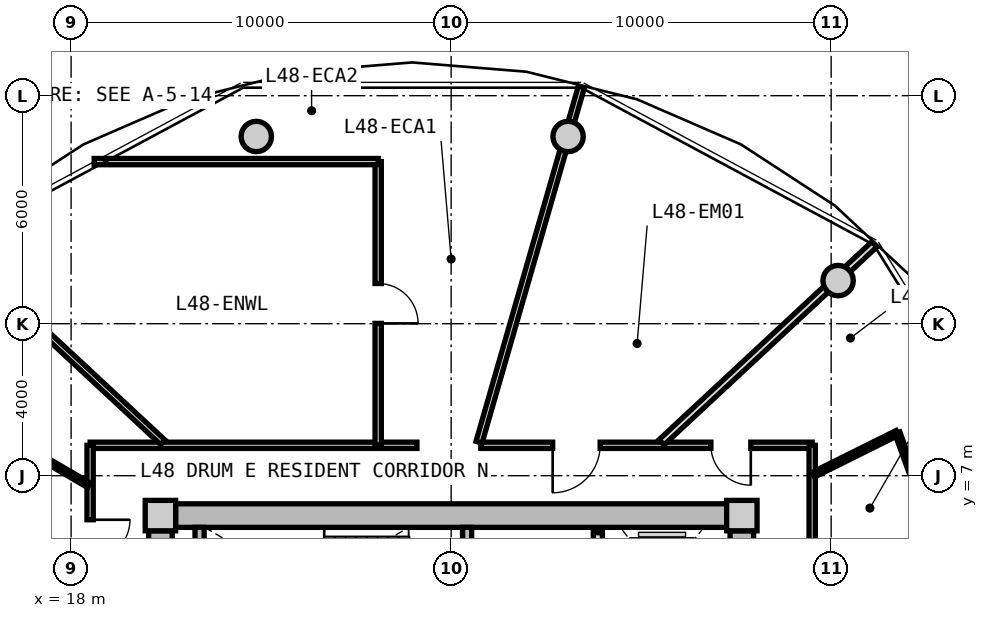
"""IFC4 building model, lengths in metres.
Left out: names, types, materials, properties, quantities, classifications, styles, units other than length and angle.
Written with IfcOpenShell. Run it as: python <this file> out.ifc"""

import sys

from ifc_helpers import new_model, si_unit, direction, frame, frame_2d, origin, origin_2d, place, context, subcontext, project, spatial, rectangle, circle, extrude, source, transform, mapped, element, fill, save


model = new_model("IFC4")
c1 = context("Model", 3, precision=1e-05, world=origin(), true_north=direction((0.0, 1.0)))
c2 = subcontext(c1, "Body", "Model", "MODEL_VIEW")
j1 = project(units=[si_unit("LENGTHUNIT", "METRE"), si_unit("PLANEANGLEUNIT", "RADIAN")], contexts=[c1])
p1 = place(None, origin())
s1 = spatial("IfcSite", under=j1, at=p1, CompositionType="ELEMENT")
p2 = place(p1, origin())
s2 = spatial("IfcBuilding", under=s1, at=p2, CompositionType="ELEMENT")
p3 = place(p2, frame((0.0, 0.0, 155.65)))
s3 = spatial("IfcBuildingStorey", under=s2, at=p3, CompositionType="ELEMENT", Elevation=155.65)
m1 = source(origin(), c2, "Body", "SweptSolid", [
    extrude(rectangle(XDim=0.8, YDim=0.8, at=origin_2d()), origin(), (0.0, 0.0, 1.0), 3.05),
])
for number, where, z_axis, x_axis in (
    (1, (35.65, 5.95, 0.0), (0.0, 0.0, 1.0), (1.0, 0.0, 0.0)),
    (2, (20.35, 5.95, 0.0), (0.0, 0.0, 1.0), (1.0, 0.0, 0.0)),
):
    element("IfcColumn", number, at=place(p3, frame(where, z_axis=z_axis, x_axis=x_axis)), inside=s3, PredefinedType="COLUMN", context=c2, shape_type="MappedRepresentation", body=[
        mapped(m1, transform((0.0, 0.0, 0.0), x_axis=(1.0, 0.0, 0.0), y_axis=(0.0, 1.0, 0.0), z_axis=(0.0, 0.0, 1.0), scale=1.0)),
    ])
m2 = source(origin(), c2, "Body", "SweptSolid", [
    extrude(rectangle(XDim=14.5, YDim=0.62, at=frame_2d((7.25, 0.0))), origin(), (0.0, 0.0, 1.0), 2.81),
])
p4 = place(p3, frame((20.75, 5.95, 0.0), z_axis=(0.0, 0.0, 1.0), x_axis=(1.0, 0.0, 0.0)))
e3 = element("IfcWall", 3, at=p4, inside=s3, PredefinedType="SHEAR", context=c2, shape_type="MappedRepresentation", body=[
    mapped(m2, transform((0.0, 0.0, 0.0), x_axis=(1.0, 0.0, 0.0), y_axis=(0.0, 1.0, 0.0), z_axis=(0.0, 0.0, 1.0), scale=1.0)),
])
m3 = source(origin(), c2, "Body", "SweptSolid", [
    extrude(rectangle(XDim=11.1, YDim=0.62, at=frame_2d((5.55, 0.0))), origin(), (0.0, 0.0, 1.0), 2.81),
])
p5 = place(p3, frame((20.35, -5.55, 0.0), z_axis=(0.0, 0.0, 1.0), x_axis=(0.0, 1.0, 0.0)))
e4 = element("IfcWall", 4, at=p5, inside=s3, PredefinedType="SHEAR", context=c2, shape_type="MappedRepresentation", body=[
    mapped(m3, transform((0.0, 0.0, 0.0), x_axis=(1.0, 0.0, 0.0), y_axis=(0.0, 1.0, 0.0), z_axis=(0.0, 0.0, 1.0), scale=1.0)),
])
p6 = place(p5, frame((3.8, 0.0, 0.0)))
e5 = element("IfcOpeningElement", 5, at=p6, cuts=e4, PredefinedType="OPENING", context=c2, shape_type="SweptSolid", body=[
    extrude(rectangle(XDim=1.2, YDim=2.15, at=frame_2d((0.6, 1.075))), frame((0.0, 0.32, 0.0), z_axis=(0.0, -1.0, 0.0), x_axis=(1.0, 0.0, 0.0)), (0.0, 0.0, 1.0), 0.64),
])
p7 = place(p3, frame((35.65, 5.55, 0.0), z_axis=(0.0, 0.0, 1.0), x_axis=(0.0, -1.0, 0.0)))
e6 = element("IfcWall", 6, at=p7, inside=s3, PredefinedType="SHEAR", context=c2, shape_type="MappedRepresentation", body=[
    mapped(m3, transform((0.0, 0.0, 0.0), x_axis=(1.0, 0.0, 0.0), y_axis=(0.0, 1.0, 0.0), z_axis=(0.0, 0.0, 1.0), scale=1.0)),
])
p8 = place(p7, frame((5.65, 0.0, 0.0)))
e7 = element("IfcOpeningElement", 7, at=p8, cuts=e6, PredefinedType="OPENING", context=c2, shape_type="SweptSolid", body=[
    extrude(rectangle(XDim=1.2, YDim=2.15, at=frame_2d((0.6, 1.075))), frame((0.0, 0.32, 0.0), z_axis=(0.0, -1.0, 0.0), x_axis=(1.0, 0.0, 0.0)), (0.0, 0.0, 1.0), 0.64),
])
m4 = source(origin(), c2, "Body", "SweptSolid", [
    extrude(circle(Radius=0.4, at=origin_2d()), origin(), (0.0, 0.0, 1.0), 3.05),
])
for number, where, z_axis, x_axis in (
    (8, (38.183, 12.135, 0.0), (0.0, 0.0, 1.0), (1.0, 0.0, 0.0)),
    (9, (31.077, 15.926, 0.0), (0.0, 0.0, 1.0), (1.0, 0.0, 0.0)),
    (10, (22.873, 15.926, 0.0), (0.0, 0.0, 1.0), (1.0, 0.0, 0.0)),
):
    element("IfcColumn", number, at=place(p3, frame(where, z_axis=z_axis, x_axis=x_axis)), inside=s3, PredefinedType="COLUMN", context=c2, shape_type="MappedRepresentation", body=[
        mapped(m4, transform((0.0, 0.0, 0.0), x_axis=(1.0, 0.0, 0.0), y_axis=(0.0, 1.0, 0.0), z_axis=(0.0, 0.0, 1.0), scale=1.0)),
    ])
m5 = source(origin(), c2, "Body", "SweptSolid", [
    extrude(rectangle(XDim=3.19, YDim=0.24, at=frame_2d((1.595, 0.0))), origin(), (0.0, 0.0, 1.0), 2.81),
])
p9 = place(p3, frame((21.38, 2.45, 0.0), z_axis=(0.0, 0.0, 1.0), x_axis=(0.0, 1.0, 0.0)))
e11 = element("IfcWall", 11, at=p9, inside=s3, PredefinedType="PARTITIONING", context=c2, shape_type="MappedRepresentation", body=[
    mapped(m5, transform((0.0, 0.0, 0.0), x_axis=(1.0, 0.0, 0.0), y_axis=(0.0, 1.0, 0.0), z_axis=(0.0, 0.0, 1.0), scale=1.0)),
])
p10 = place(p3, frame((28.42, 2.45, 0.0), z_axis=(0.0, 0.0, 1.0), x_axis=(0.0, 1.0, 0.0)))
e12 = element("IfcWall", 12, at=p10, inside=s3, PredefinedType="PARTITIONING", context=c2, shape_type="MappedRepresentation", body=[
    mapped(m5, transform((0.0, 0.0, 0.0), x_axis=(1.0, 0.0, 0.0), y_axis=(0.0, 1.0, 0.0), z_axis=(0.0, 0.0, 1.0), scale=1.0)),
])
p11 = place(p10, frame((0.55, 0.0, 0.0)))
e13 = element("IfcOpeningElement", 13, at=p11, cuts=e12, PredefinedType="OPENING", context=c2, shape_type="SweptSolid", body=[
    extrude(rectangle(XDim=1.1, YDim=2.15, at=frame_2d((0.55, 1.075))), frame((0.0, 0.13, 0.0), z_axis=(0.0, -1.0, 0.0), x_axis=(1.0, 0.0, 0.0)), (0.0, 0.0, 1.0), 0.26),
])
m6 = source(origin(), c2, "Body", "SweptSolid", [
    extrude(rectangle(XDim=5.0, YDim=0.24, at=frame_2d((2.5, 0.0))), origin(), (0.0, 0.0, 1.0), 2.795),
])
p12 = place(p3, frame((31.86, 0.5, 0.0), z_axis=(0.0, 0.0, 1.0), x_axis=(0.0, 1.0, 0.0)))
e14 = element("IfcWall", 14, at=p12, inside=s3, PredefinedType="PARTITIONING", context=c2, shape_type="MappedRepresentation", body=[
    mapped(m6, transform((0.0, 0.0, 0.0), x_axis=(1.0, 0.0, 0.0), y_axis=(0.0, 1.0, 0.0), z_axis=(0.0, 0.0, 1.0), scale=1.0)),
])
p13 = place(p12, frame((3.05, 0.0, 0.0)))
e15 = element("IfcOpeningElement", 15, at=p13, cuts=e14, PredefinedType="OPENING", context=c2, shape_type="SweptSolid", body=[
    extrude(rectangle(XDim=1.3, YDim=2.2, at=frame_2d((0.65, 1.1))), frame((0.0, 0.13, 0.0), z_axis=(0.0, -1.0, 0.0), x_axis=(1.0, 0.0, 0.0)), (0.0, 0.0, 1.0), 0.26),
])
p14 = place(p12, frame((0.55, 0.0, 0.0)))
e16 = element("IfcOpeningElement", 16, at=p14, cuts=e14, PredefinedType="OPENING", context=c2, shape_type="SweptSolid", body=[
    extrude(rectangle(XDim=1.3, YDim=2.2, at=frame_2d((0.65, 1.1))), frame((0.0, 0.13, 0.0), z_axis=(0.0, -1.0, 0.0), x_axis=(1.0, 0.0, 0.0)), (0.0, 0.0, 1.0), 0.26),
])
m7 = source(origin(), c2, "Body", "SweptSolid", [
    extrude(rectangle(XDim=8.6, YDim=0.165, at=frame_2d((4.3, 0.0))), origin(), (0.0, 0.0, 1.0), 2.795),
])
p15 = place(p3, frame((18.5, 7.8, 0.0), z_axis=(0.0, 0.0, 1.0), x_axis=(1.0, 0.0, 0.0)))
e17 = element("IfcWall", 17, at=p15, inside=s3, PredefinedType="PARTITIONING", context=c2, shape_type="MappedRepresentation", body=[
    mapped(m7, transform((0.0, 0.0, 0.0), x_axis=(1.0, 0.0, 0.0), y_axis=(0.0, 1.0, 0.0), z_axis=(0.0, 0.0, 1.0), scale=1.0)),
])
m8 = source(origin(), c2, "Body", "SweptSolid", [
    extrude(rectangle(XDim=8.719, YDim=0.165, at=frame_2d((4.36, 0.0))), origin(), (0.0, 0.0, 1.0), 2.795),
])
p16 = place(p3, frame((28.781, 7.8, 0.0), z_axis=(0.0, 0.0, 1.0), x_axis=(1.0, 0.0, 0.0)))
e18 = element("IfcWall", 18, at=p16, inside=s3, PredefinedType="PARTITIONING", context=c2, shape_type="MappedRepresentation", body=[
    mapped(m8, transform((0.0, 0.0, 0.0), x_axis=(1.0, 0.0, 0.0), y_axis=(0.0, 1.0, 0.0), z_axis=(0.0, 0.0, 1.0), scale=1.0)),
])
p17 = place(p16, frame((6.054, 0.0, 0.0)))
e19 = element("IfcOpeningElement", 19, at=p17, cuts=e18, PredefinedType="OPENING", context=c2, shape_type="SweptSolid", body=[
    extrude(rectangle(XDim=1.05, YDim=2.15, at=frame_2d((0.525, 1.075))), frame((0.0, 0.093, 0.0), z_axis=(0.0, -1.0, 0.0), x_axis=(1.0, 0.0, 0.0)), (0.0, 0.0, 1.0), 0.185),
])
p18 = place(p16, frame((1.891, 0.0, 0.0)))
e20 = element("IfcOpeningElement", 20, at=p18, cuts=e18, PredefinedType="OPENING", context=c2, shape_type="SweptSolid", body=[
    extrude(rectangle(XDim=1.25, YDim=2.2, at=frame_2d((0.625, 1.1))), frame((0.0, 0.093, 0.0), z_axis=(0.0, -1.0, 0.0), x_axis=(1.0, 0.0, 0.0)), (0.0, 0.0, 1.0), 0.185),
])
m9 = source(origin(), c2, "Body", "SweptSolid", [
    extrude(rectangle(XDim=15.6, YDim=0.165, at=frame_2d((7.8, 0.0))), origin(), (0.0, 0.0, 1.0), 2.795),
])
p19 = place(p3, frame((18.5, -7.8, 0.0), z_axis=(0.0, 0.0, 1.0), x_axis=(0.0, 1.0, 0.0)))
e21 = element("IfcWall", 21, at=p19, inside=s3, PredefinedType="PARTITIONING", context=c2, shape_type="MappedRepresentation", body=[
    mapped(m9, transform((0.0, 0.0, 0.0), x_axis=(1.0, 0.0, 0.0), y_axis=(0.0, 1.0, 0.0), z_axis=(0.0, 0.0, 1.0), scale=1.0)),
])
p20 = place(p19, frame((12.591, 0.0, 0.0)))
e22 = element("IfcOpeningElement", 22, at=p20, cuts=e21, PredefinedType="OPENING", context=c2, shape_type="SweptSolid", body=[
    extrude(rectangle(XDim=1.05, YDim=2.15, at=frame_2d((0.525, 1.075))), frame((0.0, 0.093, 0.0), z_axis=(0.0, -1.0, 0.0), x_axis=(1.0, 0.0, 0.0)), (0.0, 0.0, 1.0), 0.185),
])
p21 = place(p19, frame((8.081, 0.0, 0.0)))
e23 = element("IfcOpeningElement", 23, at=p21, cuts=e21, PredefinedType="OPENING", context=c2, shape_type="SweptSolid", body=[
    extrude(rectangle(XDim=1.05, YDim=2.15, at=frame_2d((0.525, 1.075))), frame((0.0, 0.093, 0.0), z_axis=(0.0, -1.0, 0.0), x_axis=(1.0, 0.0, 0.0)), (0.0, 0.0, 1.0), 0.185),
])
p22 = place(p19, frame((2.854, 0.0, 0.0)))
e24 = element("IfcOpeningElement", 24, at=p22, cuts=e21, PredefinedType="OPENING", context=c2, shape_type="SweptSolid", body=[
    extrude(rectangle(XDim=1.05, YDim=2.15, at=frame_2d((0.525, 1.075))), frame((0.0, 0.093, 0.0), z_axis=(0.0, -1.0, 0.0), x_axis=(1.0, 0.0, 0.0)), (0.0, 0.0, 1.0), 0.185),
])
p23 = place(p19, frame((0.452, 0.0, 0.0)))
e25 = element("IfcOpeningElement", 25, at=p23, cuts=e21, PredefinedType="OPENING", context=c2, shape_type="SweptSolid", body=[
    extrude(rectangle(XDim=0.92, YDim=2.1, at=frame_2d((0.46, 1.05))), frame((0.0, 0.093, 0.0), z_axis=(0.0, -1.0, 0.0), x_axis=(1.0, 0.0, 0.0)), (0.0, 0.0, 1.0), 0.185),
])
p24 = place(p3, frame((37.5, 7.8, 0.0), z_axis=(0.0, 0.0, 1.0), x_axis=(0.0, -1.0, 0.0)))
e26 = element("IfcWall", 26, at=p24, inside=s3, PredefinedType="PARTITIONING", context=c2, shape_type="MappedRepresentation", body=[
    mapped(m9, transform((0.0, 0.0, 0.0), x_axis=(1.0, 0.0, 0.0), y_axis=(0.0, 1.0, 0.0), z_axis=(0.0, 0.0, 1.0), scale=1.0)),
])
p25 = place(p24, frame((9.896, 0.0, 0.0)))
e27 = element("IfcOpeningElement", 27, at=p25, cuts=e26, PredefinedType="OPENING", context=c2, shape_type="SweptSolid", body=[
    extrude(rectangle(XDim=1.05, YDim=2.15, at=frame_2d((0.525, 1.075))), frame((0.0, 0.093, 0.0), z_axis=(0.0, -1.0, 0.0), x_axis=(1.0, 0.0, 0.0)), (0.0, 0.0, 1.0), 0.185),
])
p26 = place(p24, frame((4.306, 0.0, 0.0)))
e28 = element("IfcOpeningElement", 28, at=p26, cuts=e26, PredefinedType="OPENING", context=c2, shape_type="SweptSolid", body=[
    extrude(rectangle(XDim=1.05, YDim=2.15, at=frame_2d((0.525, 1.075))), frame((0.0, 0.093, 0.0), z_axis=(0.0, -1.0, 0.0), x_axis=(1.0, 0.0, 0.0)), (0.0, 0.0, 1.0), 0.185),
])
m10 = source(origin(), c2, "Body", "SweptSolid", [
    extrude(rectangle(XDim=9.73, YDim=0.165, at=frame_2d((4.865, 0.0))), origin(), (0.0, 0.0, 1.0), 2.345),
])
p27 = place(p3, frame((28.733, 7.88, 0.0), z_axis=(0.0, 0.0, 1.0), x_axis=(0.27679492614, 0.960929013436, 0.0)))
e29 = element("IfcWall", 29, at=p27, inside=s3, PredefinedType="PARTITIONING", context=c2, shape_type="MappedRepresentation", body=[
    mapped(m10, transform((0.0, 0.0, 0.0), x_axis=(1.0, 0.0, 0.0), y_axis=(0.0, 1.0, 0.0), z_axis=(0.0, 0.0, 1.0), scale=1.0)),
])
m11 = source(origin(), c2, "Body", "SweptSolid", [
    extrude(rectangle(XDim=7.648, YDim=0.165, at=frame_2d((3.824, 0.0))), origin(), (0.0, 0.0, 1.0), 2.345),
])
p28 = place(p3, frame((20.413, 7.88, 0.0), z_axis=(0.0, 0.0, 1.0), x_axis=(-0.732182665826, 0.681108320213, 0.0)))
e30 = element("IfcWall", 30, at=p28, inside=s3, PredefinedType="PARTITIONING", context=c2, shape_type="MappedRepresentation", body=[
    mapped(m11, transform((0.0, 0.0, 0.0), x_axis=(1.0, 0.0, 0.0), y_axis=(0.0, 1.0, 0.0), z_axis=(0.0, 0.0, 1.0), scale=1.0)),
])
m12 = source(origin(), c2, "Body", "SweptSolid", [
    extrude(rectangle(XDim=7.465, YDim=0.165, at=frame_2d((3.733, 0.0))), origin(), (0.0, 0.0, 1.0), 2.795),
])
p29 = place(p3, frame((26.08, 7.8, 0.0), z_axis=(0.0, 0.0, 1.0), x_axis=(0.0, 1.0, 0.0)))
e31 = element("IfcWall", 31, at=p29, inside=s3, PredefinedType="PARTITIONING", context=c2, shape_type="MappedRepresentation", body=[
    mapped(m12, transform((0.0, 0.0, 0.0), x_axis=(1.0, 0.0, 0.0), y_axis=(0.0, 1.0, 0.0), z_axis=(0.0, 0.0, 1.0), scale=1.0)),
])
p30 = place(p29, frame((3.208, 0.0, 0.0)))
e32 = element("IfcOpeningElement", 32, at=p30, cuts=e31, PredefinedType="OPENING", context=c2, shape_type="SweptSolid", body=[
    extrude(rectangle(XDim=1.05, YDim=2.15, at=frame_2d((0.525, 1.075))), frame((0.0, 0.093, 0.0), z_axis=(0.0, -1.0, 0.0), x_axis=(1.0, 0.0, 0.0)), (0.0, 0.0, 1.0), 0.185),
])
m13 = source(origin(), c2, "Body", "SweptSolid", [
    extrude(rectangle(XDim=7.473, YDim=0.165, at=frame_2d((3.737, 0.0))), origin(), (0.0, 0.0, 1.0), 2.795),
])
p31 = place(p3, frame((18.607, 15.265, 0.0), z_axis=(0.0, 0.0, 1.0), x_axis=(1.0, 0.0, 0.0)))
e33 = element("IfcWall", 33, at=p31, inside=s3, PredefinedType="PARTITIONING", context=c2, shape_type="MappedRepresentation", body=[
    mapped(m13, transform((0.0, 0.0, 0.0), x_axis=(1.0, 0.0, 0.0), y_axis=(0.0, 1.0, 0.0), z_axis=(0.0, 0.0, 1.0), scale=1.0)),
])
m14 = source(origin(), c2, "Body", "SweptSolid", [
    extrude(rectangle(XDim=8.305, YDim=0.19, at=frame_2d((4.153, 0.0))), origin(), (0.0, 0.0, 1.0), 2.345),
])
p32 = place(p3, frame((18.42, 3.908, 0.0), z_axis=(0.0, 0.0, 1.0), x_axis=(-0.970309994378, 0.241864662175, 0.0)))
e34 = element("IfcWall", 34, at=p32, inside=s3, PredefinedType="PARTITIONING", context=c2, shape_type="MappedRepresentation", body=[
    mapped(m14, transform((0.0, 0.0, 0.0), x_axis=(1.0, 0.0, 0.0), y_axis=(0.0, 1.0, 0.0), z_axis=(0.0, 0.0, 1.0), scale=1.0)),
])
m15 = source(origin(), c2, "Body", "SweptSolid", [
    extrude(rectangle(XDim=3.481, YDim=0.14, at=frame_2d((1.74, 0.0))), origin(), (0.0, 0.0, 1.0), 2.795),
])
p33 = place(p3, frame((18.47, 6.748, 0.0), z_axis=(0.0, 0.0, 1.0), x_axis=(-0.863310428788, 0.504673264148, 0.0)))
e35 = element("IfcWall", 35, at=p33, inside=s3, PredefinedType="PARTITIONING", context=c2, shape_type="MappedRepresentation", body=[
    mapped(m15, transform((0.0, 0.0, 0.0), x_axis=(1.0, 0.0, 0.0), y_axis=(0.0, 1.0, 0.0), z_axis=(0.0, 0.0, 1.0), scale=1.0)),
])
p34 = place(p33, frame((1.28, 0.0, 0.0)))
e36 = element("IfcOpeningElement", 36, at=p34, cuts=e35, PredefinedType="OPENING", context=c2, shape_type="SweptSolid", body=[
    extrude(rectangle(XDim=0.92, YDim=2.1, at=frame_2d((0.46, 1.05))), frame((0.0, 0.08, 0.0), z_axis=(0.0, -1.0, 0.0), x_axis=(1.0, 0.0, 0.0)), (0.0, 0.0, 1.0), 0.16),
])
m16 = source(origin(), c2, "Body", "SweptSolid", [
    extrude(rectangle(XDim=6.193, YDim=0.19, at=frame_2d((3.096, 0.0))), origin(), (0.0, 0.0, 1.0), 2.345),
])
p35 = place(p3, frame((37.58, 4.419, 0.0), z_axis=(0.0, 0.0, 1.0), x_axis=(0.970309243466, 0.241867674657, 0.0)))
e37 = element("IfcWall", 37, at=p35, inside=s3, PredefinedType="PARTITIONING", context=c2, shape_type="MappedRepresentation", body=[
    mapped(m16, transform((0.0, 0.0, 0.0), x_axis=(1.0, 0.0, 0.0), y_axis=(0.0, 1.0, 0.0), z_axis=(0.0, 0.0, 1.0), scale=1.0)),
])
m17 = source(origin(), c2, "Body", "SweptSolid", [
    extrude(rectangle(XDim=7.648, YDim=0.19, at=frame_2d((3.824, 0.0))), origin(), (0.0, 0.0, 1.0), 2.345),
])
p36 = place(p3, frame((33.538, 7.88, 0.0), z_axis=(0.0, 0.0, 1.0), x_axis=(0.732167856666, 0.681124239522, 0.0)))
e38 = element("IfcWall", 38, at=p36, inside=s3, PredefinedType="PARTITIONING", context=c2, shape_type="MappedRepresentation", body=[
    mapped(m17, transform((0.0, 0.0, 0.0), x_axis=(1.0, 0.0, 0.0), y_axis=(0.0, 1.0, 0.0), z_axis=(0.0, 0.0, 1.0), scale=1.0)),
])
m18 = source(origin(), c2, "Body", "SweptSolid", [
    extrude(rectangle(XDim=2.471, YDim=0.14, at=frame_2d((1.235, 0.0))), origin(), (0.0, 0.0, 1.0), 2.795),
])
p37 = place(p3, frame((37.53, 7.026, 0.0), z_axis=(0.0, 0.0, 1.0), x_axis=(0.895295102372, 0.445473545419, 0.0)))
e39 = element("IfcWall", 39, at=p37, inside=s3, PredefinedType="PARTITIONING", context=c2, shape_type="MappedRepresentation", body=[
    mapped(m18, transform((0.0, 0.0, 0.0), x_axis=(1.0, 0.0, 0.0), y_axis=(0.0, 1.0, 0.0), z_axis=(0.0, 0.0, 1.0), scale=1.0)),
])
m19 = source(origin(), c2, "Body", "SweptSolid", [
    extrude(rectangle(XDim=3.072, YDim=0.14, at=frame_2d((1.536, 0.0))), origin(), (0.0, 0.0, 1.0), 2.795),
])
p38 = place(p3, frame((39.742, 8.127, 0.0), z_axis=(0.0, 0.0, 1.0), x_axis=(0.340913456846, -0.94009468403, 0.0)))
e40 = element("IfcWall", 40, at=p38, inside=s3, PredefinedType="PARTITIONING", context=c2, shape_type="MappedRepresentation", body=[
    mapped(m19, transform((0.0, 0.0, 0.0), x_axis=(1.0, 0.0, 0.0), y_axis=(0.0, 1.0, 0.0), z_axis=(0.0, 0.0, 1.0), scale=1.0)),
])
p39 = place(p38, frame((1.076, 0.0, 0.0)))
e41 = element("IfcOpeningElement", 41, at=p39, cuts=e40, PredefinedType="OPENING", context=c2, shape_type="SweptSolid", body=[
    extrude(rectangle(XDim=0.92, YDim=2.1, at=frame_2d((0.46, 1.05))), frame((0.0, 0.08, 0.0), z_axis=(0.0, -1.0, 0.0), x_axis=(1.0, 0.0, 0.0)), (0.0, 0.0, 1.0), 0.16),
])
m20 = source(origin(), c2, "Body", "SweptSolid", [
    extrude(rectangle(XDim=1.05, YDim=2.15, at=frame_2d((0.525, 1.075))), frame((0.0, 0.025, 0.0), z_axis=(0.0, -1.0, 0.0), x_axis=(1.0, 0.0, 0.0)), (0.0, 0.0, 1.0), 0.05),
])
p40 = place(p30, frame((1.05, 0.0, 0.0), z_axis=(0.0, 0.0, 1.0), x_axis=(-1.0, 0.0, 0.0)))
e42 = element("IfcDoor", 42, at=p40, inside=s3, OperationType="SINGLE_SWING_RIGHT", PredefinedType="DOOR", context=c2, shape_type="MappedRepresentation", body=[
    mapped(m20, transform((0.0, 0.0, 0.0), x_axis=(1.0, 0.0, 0.0), y_axis=(0.0, 1.0, 0.0), z_axis=(0.0, 0.0, 1.0), scale=1.0)),
])
fill(e32, e42)
p41 = place(p20, frame((1.05, 0.0, 0.0), z_axis=(0.0, 0.0, 1.0), x_axis=(-1.0, 0.0, 0.0)))
e43 = element("IfcDoor", 43, at=p41, inside=s3, OperationType="SINGLE_SWING_LEFT", PredefinedType="DOOR", context=c2, shape_type="MappedRepresentation", body=[
    mapped(m20, transform((0.0, 0.0, 0.0), x_axis=(1.0, 0.0, 0.0), y_axis=(0.0, 1.0, 0.0), z_axis=(0.0, 0.0, 1.0), scale=1.0)),
])
fill(e22, e43)
p42 = place(p17, frame((1.05, 0.0, 0.0), z_axis=(0.0, 0.0, 1.0), x_axis=(-1.0, 0.0, 0.0)))
e44 = element("IfcDoor", 44, at=p42, inside=s3, OperationType="SINGLE_SWING_LEFT", PredefinedType="DOOR", context=c2, shape_type="MappedRepresentation", body=[
    mapped(m20, transform((0.0, 0.0, 0.0), x_axis=(1.0, 0.0, 0.0), y_axis=(0.0, 1.0, 0.0), z_axis=(0.0, 0.0, 1.0), scale=1.0)),
])
fill(e19, e44)
m21 = source(origin(), c2, "Body", "SweptSolid", [
    extrude(rectangle(XDim=1.25, YDim=2.2, at=frame_2d((0.625, 1.1))), frame((0.0, 0.025, 0.0), z_axis=(0.0, -1.0, 0.0), x_axis=(1.0, 0.0, 0.0)), (0.0, 0.0, 1.0), 0.05),
])
p43 = place(p18, frame((1.25, 0.0, 0.0), z_axis=(0.0, 0.0, 1.0), x_axis=(-1.0, 0.0, 0.0)))
e45 = element("IfcDoor", 45, at=p43, inside=s3, OperationType="SINGLE_SWING_RIGHT", PredefinedType="DOOR", context=c2, shape_type="MappedRepresentation", body=[
    mapped(m21, transform((0.0, 0.0, 0.0), x_axis=(1.0, 0.0, 0.0), y_axis=(0.0, 1.0, 0.0), z_axis=(0.0, 0.0, 1.0), scale=1.0)),
])
fill(e20, e45)
save(model, sys.argv[1])
